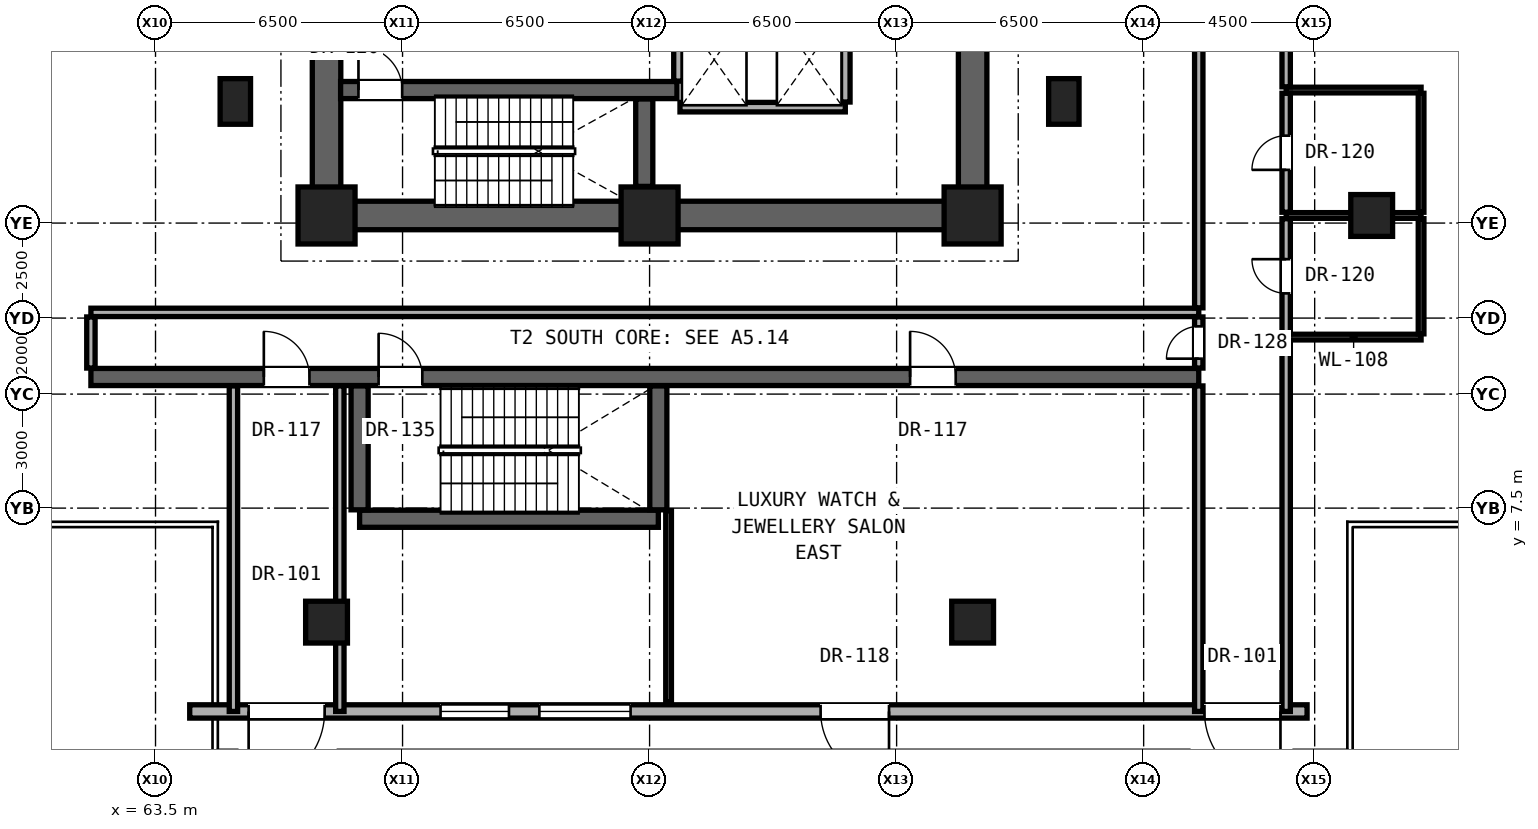
"""IFC4 building model, lengths in metres.
Left out: names, types, materials, properties, quantities, classifications, styles, units other than length and angle.
Written with IfcOpenShell. Run it as: python <this file> out.ifc"""

import sys

from ifc_helpers import new_model, si_unit, direction, frame, frame_2d, origin, origin_2d, place, context, subcontext, project, spatial, rectangle, extrude, element, fill, save


model = new_model("IFC4")
c1 = context("Model", 3, precision=1e-05, world=origin(), true_north=direction((0.0, 1.0)))
c2 = subcontext(c1, "Body", "Model", "MODEL_VIEW")
j1 = project(units=[si_unit("LENGTHUNIT", "METRE"), si_unit("PLANEANGLEUNIT", "RADIAN")], contexts=[c1])
p1 = place(None, origin())
s1 = spatial("IfcSite", under=j1, at=p1, CompositionType="ELEMENT")
p2 = place(p1, origin())
s2 = spatial("IfcBuilding", under=s1, at=p2, CompositionType="ELEMENT")
p3 = place(p2, origin())
s3 = spatial("IfcBuildingStorey", under=s2, at=p3, CompositionType="ELEMENT", Elevation=0.0)
for number, where, z_axis, x_axis in (
    (1, (68.0, 15.2, 0.0), (0.0, 0.0, 1.0), (1.0, 0.0, 0.0)),
    (2, (76.5, 15.2, 0.0), (0.0, 0.0, 1.0), (1.0, 0.0, 0.0)),
    (3, (85.0, 15.2, 0.0), (0.0, 0.0, 1.0), (1.0, 0.0, 0.0)),
):
    element("IfcColumn", number, at=place(p3, frame(where, z_axis=z_axis, x_axis=x_axis)), inside=s3, PredefinedType="COLUMN", context=c2, shape_type="SweptSolid", body=[
        extrude(rectangle(XDim=1.5, YDim=1.5, at=origin_2d()), origin(), (0.0, 0.0, 1.0), 5.2),
    ])
for number, where, z_axis, x_axis in (
    (4, (65.6, 18.2, 0.0), (0.0, 0.0, 1.0), (1.0, 0.0, 0.0)),
    (5, (87.4, 18.2, 0.0), (0.0, 0.0, 1.0), (1.0, 0.0, 0.0)),
):
    element("IfcColumn", number, at=place(p3, frame(where, z_axis=z_axis, x_axis=x_axis)), inside=s3, PredefinedType="PILASTER", context=c2, shape_type="SweptSolid", body=[
        extrude(rectangle(XDim=0.8, YDim=1.2, at=origin_2d()), origin(), (0.0, 0.0, 1.0), 5.2),
    ])
p4 = place(p3, frame((68.0, 15.2, 0.0), z_axis=(0.0, 0.0, 1.0), x_axis=(1.0, 0.0, 0.0)))
e6 = element("IfcWall", 6, at=p4, inside=s3, PredefinedType="SHEAR", context=c2, shape_type="SweptSolid", body=[
    extrude(rectangle(XDim=17.0, YDim=0.75, at=frame_2d((8.5, 0.0))), origin(), (0.0, 0.0, 1.0), 4.88),
])
for number, where, z_axis, x_axis in (
    (7, (68.0, 15.2, 0.0), (0.0, 0.0, 1.0), (0.0, 1.0, 0.0)),
    (8, (85.0, 15.2, 0.0), (0.0, 0.0, 1.0), (0.0, 1.0, 0.0)),
):
    element("IfcWall", number, at=place(p3, frame(where, z_axis=z_axis, x_axis=x_axis)), inside=s3, PredefinedType="SHEAR", context=c2, shape_type="SweptSolid", body=[
        extrude(rectangle(XDim=5.6, YDim=0.75, at=frame_2d((2.8, 0.0))), origin(), (0.0, 0.0, 1.0), 4.88),
    ])
for number, where, z_axis, x_axis in (
    (9, (68.0, 4.5, 0.0), (0.0, 0.0, 1.0), (1.0, 0.0, 0.0)),
    (10, (85.0, 4.5, 0.0), (0.0, 0.0, 1.0), (1.0, 0.0, 0.0)),
    (11, (95.5, 15.2, 0.0), (0.0, 0.0, 1.0), (1.0, 0.0, 0.0)),
):
    element("IfcColumn", number, at=place(p3, frame(where, z_axis=z_axis, x_axis=x_axis)), inside=s3, PredefinedType="COLUMN", context=c2, shape_type="SweptSolid", body=[
        extrude(rectangle(XDim=1.1, YDim=1.1, at=origin_2d()), origin(), (0.0, 0.0, 1.0), 5.2),
    ])
p5 = place(p3, frame((93.8, 2.15, 0.0), z_axis=(0.0, 0.0, 1.0), x_axis=(-1.0, 0.0, 0.0)))
e12 = element("IfcWall", 12, at=p5, inside=s3, PredefinedType="SOLIDWALL", context=c2, shape_type="SweptSolid", body=[
    extrude(rectangle(XDim=29.4, YDim=0.35, at=frame_2d((14.7, 0.0))), origin(), (0.0, 0.0, 1.0), 4.86),
])
p6 = place(p5, frame((17.8, 0.0, 0.85)))
e13 = element("IfcOpeningElement", 13, at=p6, cuts=e12, PredefinedType="OPENING", context=c2, shape_type="SweptSolid", body=[
    extrude(rectangle(XDim=2.4, YDim=2.6, at=frame_2d((1.2, 1.3))), frame((0.0, 0.185, 0.0), z_axis=(0.0, -1.0, 0.0), x_axis=(1.0, 0.0, 0.0)), (0.0, 0.0, 1.0), 0.37),
])
p7 = place(p5, frame((21.0, 0.0, 0.85)))
e14 = element("IfcOpeningElement", 14, at=p7, cuts=e12, PredefinedType="OPENING", context=c2, shape_type="SweptSolid", body=[
    extrude(rectangle(XDim=1.8, YDim=2.4, at=frame_2d((0.9, 1.2))), frame((0.0, 0.185, 0.0), z_axis=(0.0, -1.0, 0.0), x_axis=(1.0, 0.0, 0.0)), (0.0, 0.0, 1.0), 0.37),
])
p8 = place(p5, frame((0.7, 0.0, 0.0)))
e15 = element("IfcOpeningElement", 15, at=p8, cuts=e12, PredefinedType="OPENING", context=c2, shape_type="SweptSolid", body=[
    extrude(rectangle(XDim=2.0, YDim=2.4, at=frame_2d((1.0, 1.2))), frame((0.0, 0.185, 0.0), z_axis=(0.0, -1.0, 0.0), x_axis=(1.0, 0.0, 0.0)), (0.0, 0.0, 1.0), 0.37),
])
p9 = place(p5, frame((11.0, 0.0, 0.0)))
e16 = element("IfcOpeningElement", 16, at=p9, cuts=e12, PredefinedType="OPENING", context=c2, shape_type="SweptSolid", body=[
    extrude(rectangle(XDim=1.8, YDim=2.5, at=frame_2d((0.9, 1.25))), frame((0.0, 0.185, 0.0), z_axis=(0.0, -1.0, 0.0), x_axis=(1.0, 0.0, 0.0)), (0.0, 0.0, 1.0), 0.37),
])
p10 = place(p5, frame((25.85, 0.0, 0.0)))
e17 = element("IfcOpeningElement", 17, at=p10, cuts=e12, PredefinedType="OPENING", context=c2, shape_type="SweptSolid", body=[
    extrude(rectangle(XDim=2.0, YDim=2.4, at=frame_2d((1.0, 1.2))), frame((0.0, 0.185, 0.0), z_axis=(0.0, -1.0, 0.0), x_axis=(1.0, 0.0, 0.0)), (0.0, 0.0, 1.0), 0.37),
])
p11 = place(p3, frame((68.87, 7.22, 0.0), z_axis=(0.0, 0.0, 1.0), x_axis=(1.0, 0.0, 0.0)))
e18 = element("IfcWall", 18, at=p11, inside=s3, PredefinedType="SHEAR", context=c2, shape_type="SweptSolid", body=[
    extrude(rectangle(XDim=7.86, YDim=0.45, at=frame_2d((3.93, 0.0))), origin(), (0.0, 0.0, 1.0), 4.88),
])
p12 = place(p3, frame((61.8, 10.95, 0.0), z_axis=(0.0, 0.0, 1.0), x_axis=(1.0, 0.0, 0.0)))
e19 = element("IfcWall", 19, at=p12, inside=s3, PredefinedType="SHEAR", context=c2, shape_type="SweptSolid", body=[
    extrude(rectangle(XDim=29.15, YDim=0.45, at=frame_2d((14.575, 0.0))), origin(), (0.0, 0.0, 1.0), 4.88),
])
p13 = place(p12, frame((4.55, 0.0, 0.0)))
e20 = element("IfcOpeningElement", 20, at=p13, cuts=e19, PredefinedType="OPENING", context=c2, shape_type="SweptSolid", body=[
    extrude(rectangle(XDim=1.2, YDim=2.25, at=frame_2d((0.6, 1.125))), frame((0.0, 0.235, 0.0), z_axis=(0.0, -1.0, 0.0), x_axis=(1.0, 0.0, 0.0)), (0.0, 0.0, 1.0), 0.47),
])
p14 = place(p12, frame((7.57, 0.0, 0.0)))
e21 = element("IfcOpeningElement", 21, at=p14, cuts=e19, PredefinedType="OPENING", context=c2, shape_type="SweptSolid", body=[
    extrude(rectangle(XDim=1.15, YDim=2.2, at=frame_2d((0.575, 1.1))), frame((0.0, 0.235, 0.0), z_axis=(0.0, -1.0, 0.0), x_axis=(1.0, 0.0, 0.0)), (0.0, 0.0, 1.0), 0.47),
])
p15 = place(p12, frame((21.555, 0.0, 0.0)))
e22 = element("IfcOpeningElement", 22, at=p15, cuts=e19, PredefinedType="OPENING", context=c2, shape_type="SweptSolid", body=[
    extrude(rectangle(XDim=1.2, YDim=2.25, at=frame_2d((0.6, 1.125))), frame((0.0, 0.235, 0.0), z_axis=(0.0, -1.0, 0.0), x_axis=(1.0, 0.0, 0.0)), (0.0, 0.0, 1.0), 0.47),
])
p16 = place(p3, frame((93.25, 12.0, 0.0), z_axis=(0.0, 0.0, 1.0), x_axis=(1.0, 0.0, 0.0)))
e23 = element("IfcWall", 23, at=p16, inside=s3, PredefinedType="PARTITIONING", context=c2, shape_type="SweptSolid", body=[
    extrude(rectangle(XDim=3.55, YDim=0.15, at=frame_2d((1.775, 0.0))), origin(), (0.0, 0.0, 1.0), 4.88),
])
p17 = place(p3, frame((61.8, 12.65, 0.0), z_axis=(0.0, 0.0, 1.0), x_axis=(1.0, 0.0, 0.0)))
e24 = element("IfcWall", 24, at=p17, inside=s3, PredefinedType="SOLIDWALL", context=c2, shape_type="SweptSolid", body=[
    extrude(rectangle(XDim=29.15, YDim=0.22, at=frame_2d((14.575, 0.0))), origin(), (0.0, 0.0, 1.0), 4.016),
])
p18 = place(p3, frame((93.25, 15.2, 0.0), z_axis=(0.0, 0.0, 1.0), x_axis=(1.0, 0.0, 0.0)))
e25 = element("IfcWall", 25, at=p18, inside=s3, PredefinedType="PARTITIONING", context=c2, shape_type="SweptSolid", body=[
    extrude(rectangle(XDim=3.55, YDim=0.15, at=frame_2d((1.775, 0.0))), origin(), (0.0, 0.0, 1.0), 4.016),
])
p19 = place(p3, frame((77.3, 18.05, 0.0), z_axis=(0.0, 0.0, 1.0), x_axis=(1.0, 0.0, 0.0)))
e26 = element("IfcWall", 26, at=p19, inside=s3, PredefinedType="SOLIDWALL", context=c2, shape_type="SweptSolid", body=[
    extrude(rectangle(XDim=4.35, YDim=0.25, at=frame_2d((2.175, 0.0))), origin(), (0.0, 0.0, 1.0), 4.88),
])
p20 = place(p3, frame((68.37, 18.5, 0.0), z_axis=(0.0, 0.0, 1.0), x_axis=(1.0, 0.0, 0.0)))
e27 = element("IfcWall", 27, at=p20, inside=s3, PredefinedType="SHEAR", context=c2, shape_type="SweptSolid", body=[
    extrude(rectangle(XDim=8.85, YDim=0.45, at=frame_2d((4.425, 0.0))), origin(), (0.0, 0.0, 1.0), 4.88),
])
p21 = place(p20, frame((0.47, 0.0, 0.0)))
e28 = element("IfcOpeningElement", 28, at=p21, cuts=e27, PredefinedType="OPENING", context=c2, shape_type="SweptSolid", body=[
    extrude(rectangle(XDim=1.15, YDim=2.2, at=frame_2d((0.575, 1.1))), frame((0.0, 0.235, 0.0), z_axis=(0.0, -1.0, 0.0), x_axis=(1.0, 0.0, 0.0)), (0.0, 0.0, 1.0), 0.47),
])
p22 = place(p3, frame((93.25, 18.5, 0.0), z_axis=(0.0, 0.0, 1.0), x_axis=(1.0, 0.0, 0.0)))
e29 = element("IfcWall", 29, at=p22, inside=s3, PredefinedType="PARTITIONING", context=c2, shape_type="SweptSolid", body=[
    extrude(rectangle(XDim=3.55, YDim=0.15, at=frame_2d((1.775, 0.0))), origin(), (0.0, 0.0, 1.0), 4.016),
])
p23 = place(p3, frame((61.8, 11.185, 0.0), z_axis=(0.0, 0.0, 1.0), x_axis=(0.0, 1.0, 0.0)))
e30 = element("IfcWall", 30, at=p23, inside=s3, PredefinedType="SOLIDWALL", context=c2, shape_type="SweptSolid", body=[
    extrude(rectangle(XDim=1.345, YDim=0.22, at=frame_2d((0.672, 0.0))), origin(), (0.0, 0.0, 1.0), 4.88),
])
p24 = place(p3, frame((65.55, 2.15, 0.0), z_axis=(0.0, 0.0, 1.0), x_axis=(0.0, 1.0, 0.0)))
e31 = element("IfcWall", 31, at=p24, inside=s3, PredefinedType="SOLIDWALL", context=c2, shape_type="SweptSolid", body=[
    extrude(rectangle(XDim=8.565, YDim=0.22, at=frame_2d((4.283, 0.0))), origin(), (0.0, 0.0, 1.0), 4.099),
])
p25 = place(p3, frame((68.35, 2.15, 0.0), z_axis=(0.0, 0.0, 1.0), x_axis=(0.0, 1.0, 0.0)))
e32 = element("IfcWall", 32, at=p25, inside=s3, PredefinedType="SOLIDWALL", context=c2, shape_type="SweptSolid", body=[
    extrude(rectangle(XDim=8.565, YDim=0.22, at=frame_2d((4.283, 0.0))), origin(), (0.0, 0.0, 1.0), 4.016),
])
p26 = place(p3, frame((68.87, 7.455, 0.0), z_axis=(0.0, 0.0, 1.0), x_axis=(0.0, 1.0, 0.0)))
e33 = element("IfcWall", 33, at=p26, inside=s3, PredefinedType="SHEAR", context=c2, shape_type="SweptSolid", body=[
    extrude(rectangle(XDim=3.26, YDim=0.45, at=frame_2d((1.63, 0.0))), origin(), (0.0, 0.0, 1.0), 4.88),
])
p27 = place(p3, frame((76.36, 15.965, 0.0), z_axis=(0.0, 0.0, 1.0), x_axis=(0.0, 1.0, 0.0)))
e34 = element("IfcWall", 34, at=p27, inside=s3, PredefinedType="SHEAR", context=c2, shape_type="SweptSolid", body=[
    extrude(rectangle(XDim=2.3, YDim=0.45, at=frame_2d((1.15, 0.0))), origin(), (0.0, 0.0, 1.0), 4.88),
])
p28 = place(p3, frame((76.73, 7.455, 0.0), z_axis=(0.0, 0.0, 1.0), x_axis=(0.0, 1.0, 0.0)))
e35 = element("IfcWall", 35, at=p28, inside=s3, PredefinedType="SHEAR", context=c2, shape_type="SweptSolid", body=[
    extrude(rectangle(XDim=3.26, YDim=0.45, at=frame_2d((1.63, 0.0))), origin(), (0.0, 0.0, 1.0), 4.88),
])
p29 = place(p3, frame((77.0, 2.4, 0.0), z_axis=(0.0, 0.0, 1.0), x_axis=(0.0, 1.0, 0.0)))
e36 = element("IfcWall", 36, at=p29, inside=s3, PredefinedType="PARTITIONING", context=c2, shape_type="SweptSolid", body=[
    extrude(rectangle(XDim=5.035, YDim=0.15, at=frame_2d((2.518, 0.0))), origin(), (0.0, 0.0, 1.0), 4.016),
])
p30 = place(p3, frame((77.26, 18.735, 0.0), z_axis=(0.0, 0.0, 1.0), x_axis=(0.0, 1.0, 0.0)))
e37 = element("IfcWall", 37, at=p30, inside=s3, PredefinedType="SOLIDWALL", context=c2, shape_type="SweptSolid", body=[
    extrude(rectangle(XDim=1.695, YDim=0.25, at=frame_2d((0.847, 0.0))), origin(), (0.0, 0.0, 1.0), 4.88),
])
p31 = place(p3, frame((81.65, 18.185, 0.0), z_axis=(0.0, 0.0, 1.0), x_axis=(0.0, 1.0, 0.0)))
e38 = element("IfcWall", 38, at=p31, inside=s3, PredefinedType="SOLIDWALL", context=c2, shape_type="SweptSolid", body=[
    extrude(rectangle(XDim=2.245, YDim=0.25, at=frame_2d((1.123, 0.0))), origin(), (0.0, 0.0, 1.0), 4.88),
])
p32 = place(p3, frame((90.95, 2.15, 0.0), z_axis=(0.0, 0.0, 1.0), x_axis=(0.0, 1.0, 0.0)))
e39 = element("IfcWall", 39, at=p32, inside=s3, PredefinedType="SOLIDWALL", context=c2, shape_type="SweptSolid", body=[
    extrude(rectangle(XDim=8.565, YDim=0.22, at=frame_2d((4.283, 0.0))), origin(), (0.0, 0.0, 1.0), 4.88),
])
p33 = place(p3, frame((90.95, 11.185, 0.0), z_axis=(0.0, 0.0, 1.0), x_axis=(0.0, 1.0, 0.0)))
e40 = element("IfcWall", 40, at=p33, inside=s3, PredefinedType="SOLIDWALL", context=c2, shape_type="SweptSolid", body=[
    extrude(rectangle(XDim=1.345, YDim=0.22, at=frame_2d((0.672, 0.0))), origin(), (0.0, 0.0, 1.0), 4.88),
])
p34 = place(p33, frame((0.248, 0.0, 0.0)))
e41 = element("IfcOpeningElement", 41, at=p34, cuts=e40, PredefinedType="OPENING", context=c2, shape_type="SweptSolid", body=[
    extrude(rectangle(XDim=0.85, YDim=2.01, at=frame_2d((0.425, 1.005))), frame((0.0, 0.12, 0.0), z_axis=(0.0, -1.0, 0.0), x_axis=(1.0, 0.0, 0.0)), (0.0, 0.0, 1.0), 0.24),
])
p35 = place(p3, frame((90.95, 12.77, 0.0), z_axis=(0.0, 0.0, 1.0), x_axis=(0.0, 1.0, 0.0)))
e42 = element("IfcWall", 42, at=p35, inside=s3, PredefinedType="SOLIDWALL", context=c2, shape_type="SweptSolid", body=[
    extrude(rectangle(XDim=7.91, YDim=0.22, at=frame_2d((3.955, 0.0))), origin(), (0.0, 0.0, 1.0), 4.016),
])
p36 = place(p3, frame((93.25, 2.15, 0.0), z_axis=(0.0, 0.0, 1.0), x_axis=(0.0, 1.0, 0.0)))
e43 = element("IfcWall", 43, at=p36, inside=s3, PredefinedType="SOLIDWALL", context=c2, shape_type="SweptSolid", body=[
    extrude(rectangle(XDim=9.765, YDim=0.22, at=frame_2d((4.883, 0.0))), origin(), (0.0, 0.0, 1.0), 4.88),
])
p37 = place(p3, frame((93.25, 12.085, 0.0), z_axis=(0.0, 0.0, 1.0), x_axis=(0.0, 1.0, 0.0)))
e44 = element("IfcWall", 44, at=p37, inside=s3, PredefinedType="SOLIDWALL", context=c2, shape_type="SweptSolid", body=[
    extrude(rectangle(XDim=3.03, YDim=0.22, at=frame_2d((1.515, 0.0))), origin(), (0.0, 0.0, 1.0), 4.016),
])
p38 = place(p37, frame((1.065, 0.0, 0.0)))
e45 = element("IfcOpeningElement", 45, at=p38, cuts=e44, PredefinedType="OPENING", context=c2, shape_type="SweptSolid", body=[
    extrude(rectangle(XDim=0.9, YDim=2.1, at=frame_2d((0.45, 1.05))), frame((0.0, 0.12, 0.0), z_axis=(0.0, -1.0, 0.0), x_axis=(1.0, 0.0, 0.0)), (0.0, 0.0, 1.0), 0.24),
])
p39 = place(p3, frame((93.25, 15.285, 0.0), z_axis=(0.0, 0.0, 1.0), x_axis=(0.0, 1.0, 0.0)))
e46 = element("IfcWall", 46, at=p39, inside=s3, PredefinedType="SOLIDWALL", context=c2, shape_type="SweptSolid", body=[
    extrude(rectangle(XDim=3.13, YDim=0.22, at=frame_2d((1.565, 0.0))), origin(), (0.0, 0.0, 1.0), 4.016),
])
p40 = place(p39, frame((1.115, 0.0, 0.0)))
e47 = element("IfcOpeningElement", 47, at=p40, cuts=e46, PredefinedType="OPENING", context=c2, shape_type="SweptSolid", body=[
    extrude(rectangle(XDim=0.9, YDim=2.1, at=frame_2d((0.45, 1.05))), frame((0.0, 0.12, 0.0), z_axis=(0.0, -1.0, 0.0), x_axis=(1.0, 0.0, 0.0)), (0.0, 0.0, 1.0), 0.24),
])
p41 = place(p3, frame((93.25, 18.585, 0.0), z_axis=(0.0, 0.0, 1.0), x_axis=(0.0, 1.0, 0.0)))
e48 = element("IfcWall", 48, at=p41, inside=s3, PredefinedType="SOLIDWALL", context=c2, shape_type="SweptSolid", body=[
    extrude(rectangle(XDim=5.33, YDim=0.22, at=frame_2d((2.665, 0.0))), origin(), (0.0, 0.0, 1.0), 4.88),
])
p42 = place(p3, frame((96.8, 12.085, 0.0), z_axis=(0.0, 0.0, 1.0), x_axis=(0.0, 1.0, 0.0)))
e49 = element("IfcWall", 49, at=p42, inside=s3, PredefinedType="PARTITIONING", context=c2, shape_type="SweptSolid", body=[
    extrude(rectangle(XDim=3.03, YDim=0.15, at=frame_2d((1.515, 0.0))), origin(), (0.0, 0.0, 1.0), 4.88),
])
p43 = place(p3, frame((96.8, 15.285, 0.0), z_axis=(0.0, 0.0, 1.0), x_axis=(0.0, 1.0, 0.0)))
e50 = element("IfcWall", 50, at=p43, inside=s3, PredefinedType="PARTITIONING", context=c2, shape_type="SweptSolid", body=[
    extrude(rectangle(XDim=3.13, YDim=0.15, at=frame_2d((1.565, 0.0))), origin(), (0.0, 0.0, 1.0), 4.88),
])
p44 = place(p6, origin())
e51 = element("IfcWindow", 51, at=p44, inside=s3, PartitioningType="SINGLE_PANEL", PredefinedType="WINDOW", context=c2, shape_type="SweptSolid", body=[
    extrude(rectangle(XDim=2.4, YDim=2.6, at=frame_2d((1.2, 1.3))), frame((0.0, 0.03, 0.0), z_axis=(0.0, -1.0, 0.0), x_axis=(1.0, 0.0, 0.0)), (0.0, 0.0, 1.0), 0.06),
])
fill(e13, e51)
p45 = place(p7, origin())
e52 = element("IfcWindow", 52, at=p45, inside=s3, PartitioningType="SINGLE_PANEL", PredefinedType="WINDOW", context=c2, shape_type="SweptSolid", body=[
    extrude(rectangle(XDim=1.8, YDim=2.4, at=frame_2d((0.9, 1.2))), frame((0.0, 0.03, 0.0), z_axis=(0.0, -1.0, 0.0), x_axis=(1.0, 0.0, 0.0)), (0.0, 0.0, 1.0), 0.06),
])
fill(e14, e52)
p46 = place(p8, origin())
e53 = element("IfcDoor", 53, at=p46, inside=s3, OperationType="SINGLE_SWING_LEFT", PredefinedType="DOOR", context=c2, shape_type="SweptSolid", body=[
    extrude(rectangle(XDim=2.0, YDim=2.4, at=frame_2d((1.0, 1.2))), frame((0.0, 0.025, 0.0), z_axis=(0.0, -1.0, 0.0), x_axis=(1.0, 0.0, 0.0)), (0.0, 0.0, 1.0), 0.05),
])
fill(e15, e53)
p47 = place(p9, origin())
e54 = element("IfcDoor", 54, at=p47, inside=s3, OperationType="SINGLE_SWING_LEFT", PredefinedType="DOOR", context=c2, shape_type="SweptSolid", body=[
    extrude(rectangle(XDim=1.8, YDim=2.5, at=frame_2d((0.9, 1.25))), frame((0.0, 0.025, 0.0), z_axis=(0.0, -1.0, 0.0), x_axis=(1.0, 0.0, 0.0)), (0.0, 0.0, 1.0), 0.05),
])
fill(e16, e54)
p48 = place(p10, origin())
e55 = element("IfcDoor", 55, at=p48, inside=s3, OperationType="SINGLE_SWING_RIGHT", PredefinedType="DOOR", context=c2, shape_type="SweptSolid", body=[
    extrude(rectangle(XDim=2.0, YDim=2.4, at=frame_2d((1.0, 1.2))), frame((0.0, 0.025, 0.0), z_axis=(0.0, -1.0, 0.0), x_axis=(1.0, 0.0, 0.0)), (0.0, 0.0, 1.0), 0.05),
])
fill(e17, e55)
p49 = place(p21, origin())
e56 = element("IfcDoor", 56, at=p49, inside=s3, OperationType="SINGLE_SWING_LEFT", PredefinedType="DOOR", context=c2, shape_type="SweptSolid", body=[
    extrude(rectangle(XDim=1.15, YDim=2.2, at=frame_2d((0.575, 1.1))), frame((0.0, 0.025, 0.0), z_axis=(0.0, -1.0, 0.0), x_axis=(1.0, 0.0, 0.0)), (0.0, 0.0, 1.0), 0.05),
])
fill(e28, e56)
p50 = place(p34, origin())
e57 = element("IfcDoor", 57, at=p50, inside=s3, OperationType="SINGLE_SWING_LEFT", PredefinedType="DOOR", context=c2, shape_type="SweptSolid", body=[
    extrude(rectangle(XDim=0.85, YDim=2.01, at=frame_2d((0.425, 1.005))), frame((0.0, 0.025, 0.0), z_axis=(0.0, -1.0, 0.0), x_axis=(1.0, 0.0, 0.0)), (0.0, 0.0, 1.0), 0.05),
])
fill(e41, e57)
p51 = place(p13, origin())
e58 = element("IfcDoor", 58, at=p51, inside=s3, OperationType="SINGLE_SWING_LEFT", PredefinedType="DOOR", context=c2, shape_type="SweptSolid", body=[
    extrude(rectangle(XDim=1.2, YDim=2.25, at=frame_2d((0.6, 1.125))), frame((0.0, 0.025, 0.0), z_axis=(0.0, -1.0, 0.0), x_axis=(1.0, 0.0, 0.0)), (0.0, 0.0, 1.0), 0.05),
])
fill(e20, e58)
p52 = place(p14, origin())
e59 = element("IfcDoor", 59, at=p52, inside=s3, OperationType="SINGLE_SWING_LEFT", PredefinedType="DOOR", context=c2, shape_type="SweptSolid", body=[
    extrude(rectangle(XDim=1.15, YDim=2.2, at=frame_2d((0.575, 1.1))), frame((0.0, 0.025, 0.0), z_axis=(0.0, -1.0, 0.0), x_axis=(1.0, 0.0, 0.0)), (0.0, 0.0, 1.0), 0.05),
])
fill(e21, e59)
p53 = place(p15, origin())
e60 = element("IfcDoor", 60, at=p53, inside=s3, OperationType="SINGLE_SWING_LEFT", PredefinedType="DOOR", context=c2, shape_type="SweptSolid", body=[
    extrude(rectangle(XDim=1.2, YDim=2.25, at=frame_2d((0.6, 1.125))), frame((0.0, 0.025, 0.0), z_axis=(0.0, -1.0, 0.0), x_axis=(1.0, 0.0, 0.0)), (0.0, 0.0, 1.0), 0.05),
])
fill(e22, e60)
p54 = place(p38, origin())
e61 = element("IfcDoor", 61, at=p54, inside=s3, OperationType="SINGLE_SWING_RIGHT", PredefinedType="DOOR", context=c2, shape_type="SweptSolid", body=[
    extrude(rectangle(XDim=0.9, YDim=2.1, at=frame_2d((0.45, 1.05))), frame((0.0, 0.025, 0.0), z_axis=(0.0, -1.0, 0.0), x_axis=(1.0, 0.0, 0.0)), (0.0, 0.0, 1.0), 0.05),
])
fill(e45, e61)
p55 = place(p40, origin())
e62 = element("IfcDoor", 62, at=p55, inside=s3, OperationType="SINGLE_SWING_LEFT", PredefinedType="DOOR", context=c2, shape_type="SweptSolid", body=[
    extrude(rectangle(XDim=0.9, YDim=2.1, at=frame_2d((0.45, 1.05))), frame((0.0, 0.025, 0.0), z_axis=(0.0, -1.0, 0.0), x_axis=(1.0, 0.0, 0.0)), (0.0, 0.0, 1.0), 0.05),
])
fill(e47, e62)
save(model, sys.argv[1])
